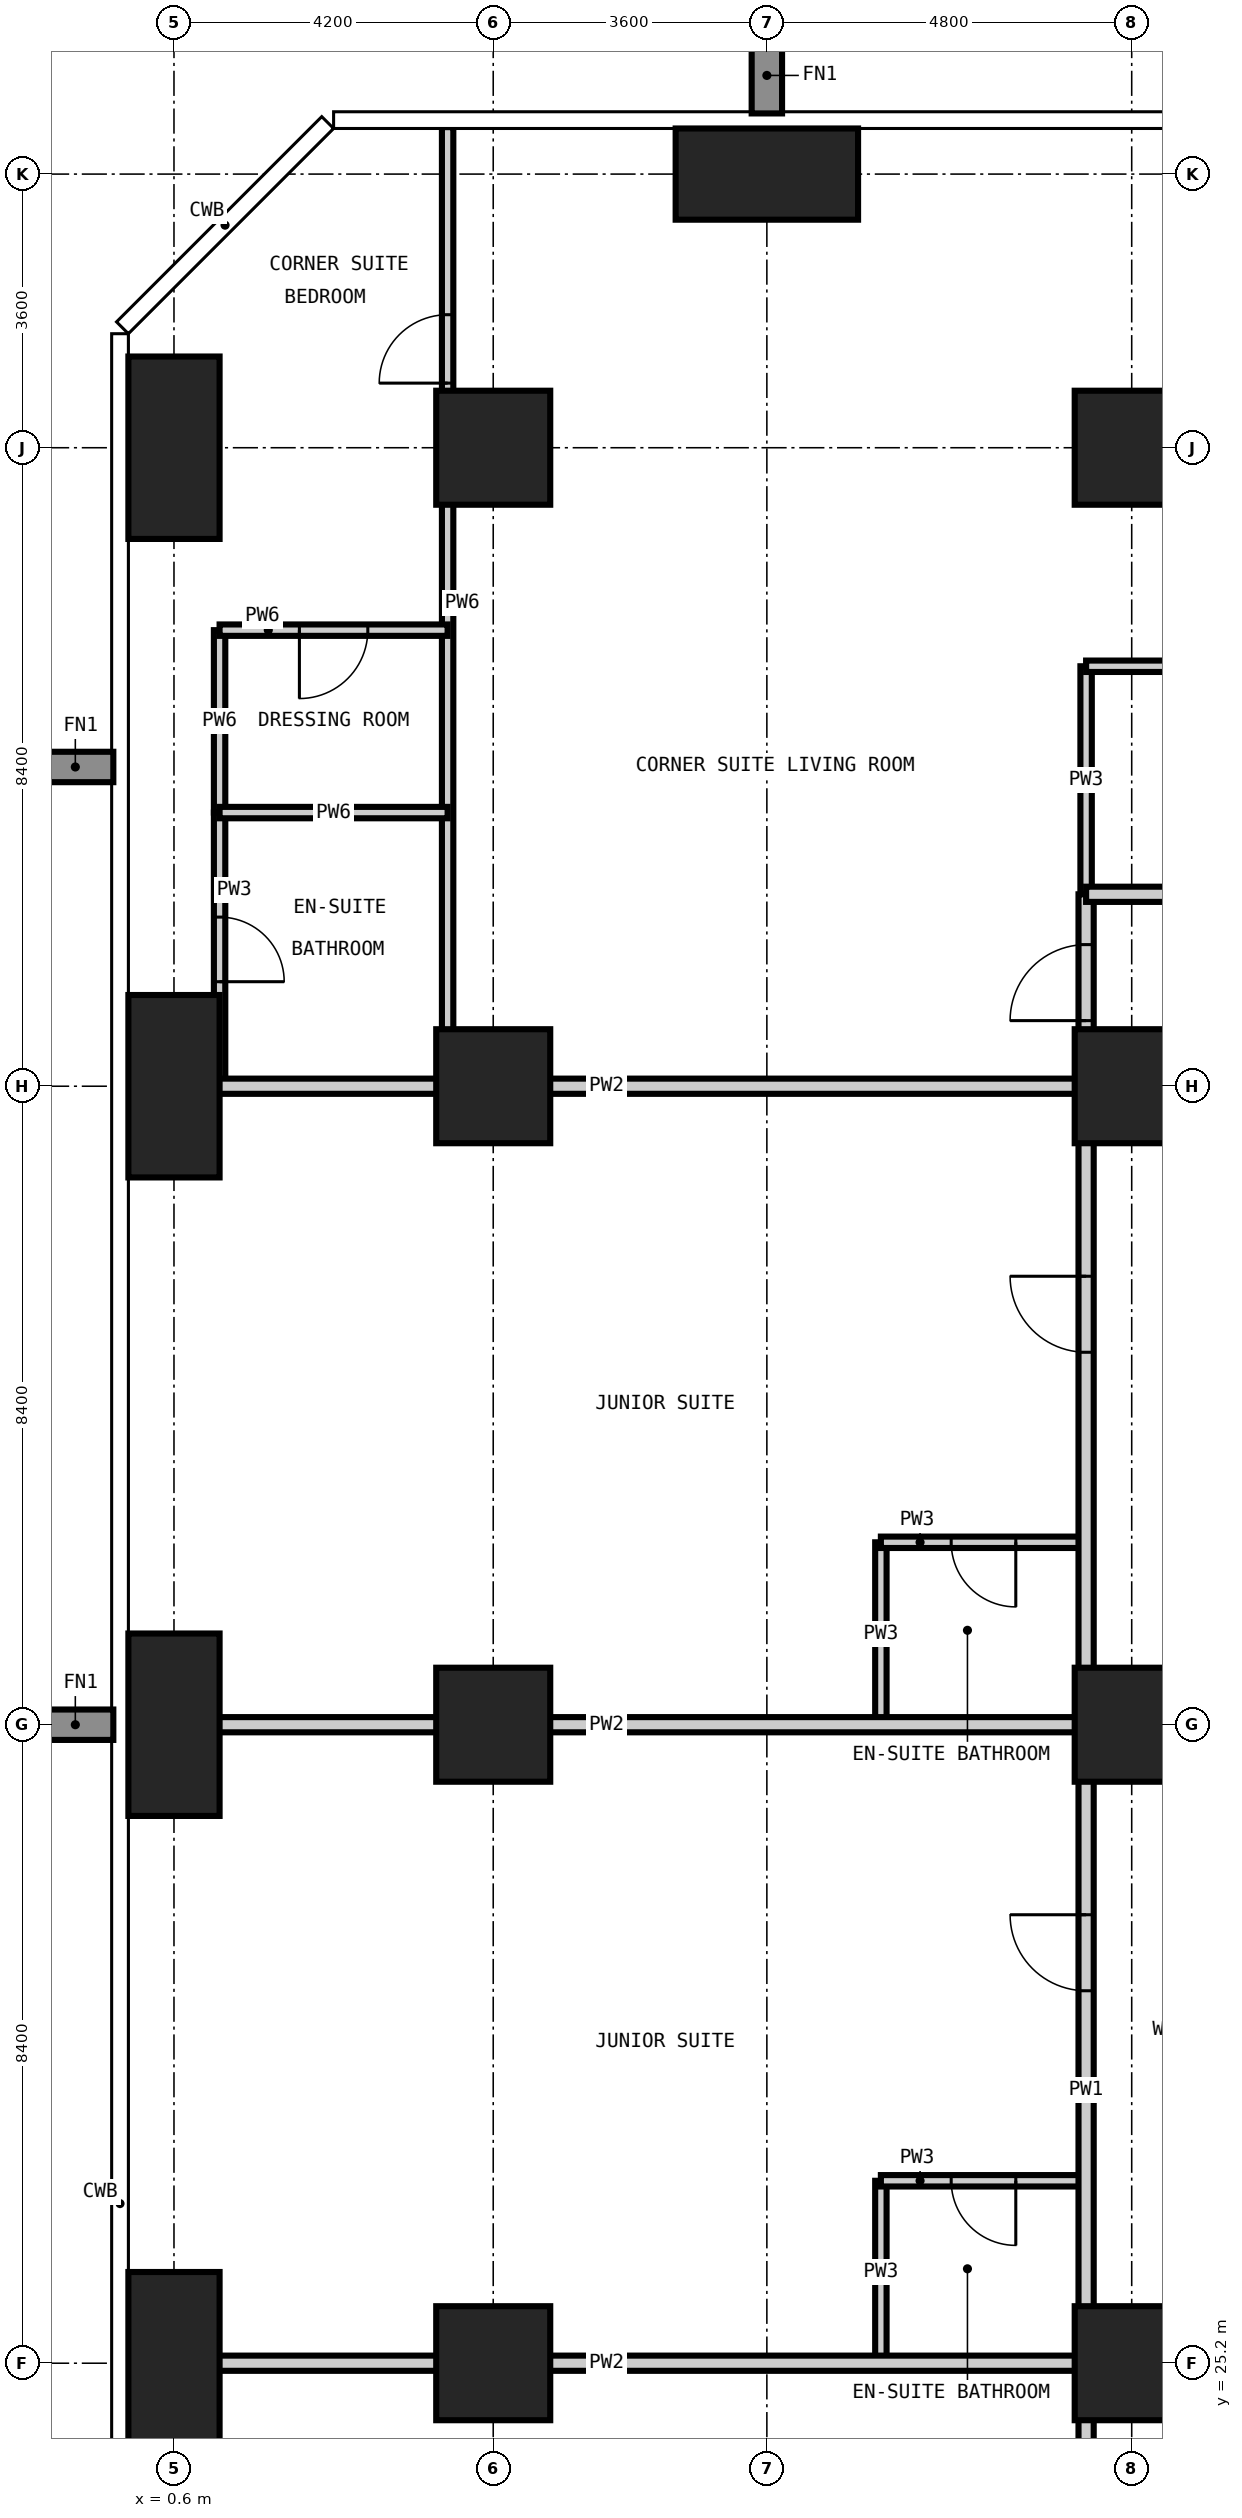
"""IFC4 building model, lengths in metres.
Left out: names, types, materials, properties, quantities, classifications, styles, units other than length and angle.
Written with IfcOpenShell. Run it as: python <this file> out.ifc"""

import sys

from ifc_helpers import new_model, si_unit, direction, frame, frame_2d, origin, origin_2d, place, context, subcontext, project, spatial, rectangle, extrude, element, fill, save


model = new_model("IFC4")
c1 = context("Model", 3, precision=1e-05, world=origin(), true_north=direction((0.0, 1.0)))
c2 = subcontext(c1, "Body", "Model", "MODEL_VIEW")
j1 = project(units=[si_unit("LENGTHUNIT", "METRE"), si_unit("PLANEANGLEUNIT", "RADIAN")], contexts=[c1])
p1 = place(None, origin())
s1 = spatial("IfcSite", under=j1, at=p1, CompositionType="ELEMENT")
p2 = place(p1, origin())
s2 = spatial("IfcBuilding", under=s1, at=p2, CompositionType="ELEMENT")
p3 = place(p2, frame((0.0, 0.0, 118.8)))
s3 = spatial("IfcBuildingStorey", under=s2, at=p3, CompositionType="ELEMENT", Elevation=118.8)
for number, where, z_axis, x_axis in (
    (1, (0.6, 25.2, -0.35), (0.0, 0.0, 1.0), (1.0, 0.0, 0.0)),
    (2, (0.6, 33.6, -0.35), (0.0, 0.0, 1.0), (1.0, 0.0, 0.0)),
    (3, (0.6, 42.0, -0.35), (0.0, 0.0, 1.0), (1.0, 0.0, 0.0)),
    (4, (0.6, 50.4, -0.35), (0.0, 0.0, 1.0), (1.0, 0.0, 0.0)),
):
    element("IfcColumn", number, at=place(p3, frame(where, z_axis=z_axis, x_axis=x_axis)), inside=s3, PredefinedType="COLUMN", context=c2, shape_type="SweptSolid", body=[
        extrude(rectangle(XDim=1.2, YDim=2.4, at=origin_2d()), origin(), (0.0, 0.0, 1.0), 3.6),
    ])
for number, where, z_axis, x_axis in (
    (5, (4.8, 25.2, -0.35), (0.0, 0.0, 1.0), (1.0, 0.0, 0.0)),
    (6, (4.8, 33.6, -0.35), (0.0, 0.0, 1.0), (1.0, 0.0, 0.0)),
    (7, (4.8, 42.0, -0.35), (0.0, 0.0, 1.0), (1.0, 0.0, 0.0)),
    (8, (4.8, 50.4, -0.35), (0.0, 0.0, 1.0), (1.0, 0.0, 0.0)),
):
    element("IfcColumn", number, at=place(p3, frame(where, z_axis=z_axis, x_axis=x_axis)), inside=s3, PredefinedType="COLUMN", context=c2, shape_type="SweptSolid", body=[
        extrude(rectangle(XDim=1.5, YDim=1.5, at=origin_2d()), origin(), (0.0, 0.0, 1.0), 3.6),
    ])
p4 = place(p3, frame((8.4, 54.0, -0.35), z_axis=(0.0, 0.0, 1.0), x_axis=(1.0, 0.0, 0.0)))
e9 = element("IfcColumn", 9, at=p4, inside=s3, PredefinedType="COLUMN", context=c2, shape_type="SweptSolid", body=[
    extrude(rectangle(XDim=2.4, YDim=1.2, at=origin_2d()), origin(), (0.0, 0.0, 1.0), 3.6),
])
for number, where, z_axis, x_axis in (
    (10, (13.2, 25.2, -0.35), (0.0, 0.0, 1.0), (1.0, 0.0, 0.0)),
    (11, (13.2, 33.6, -0.35), (0.0, 0.0, 1.0), (1.0, 0.0, 0.0)),
    (12, (13.2, 42.0, -0.35), (0.0, 0.0, 1.0), (1.0, 0.0, 0.0)),
    (13, (13.2, 50.4, -0.35), (0.0, 0.0, 1.0), (1.0, 0.0, 0.0)),
):
    element("IfcColumn", number, at=place(p3, frame(where, z_axis=z_axis, x_axis=x_axis)), inside=s3, PredefinedType="COLUMN", context=c2, shape_type="SweptSolid", body=[
        extrude(rectangle(XDim=1.5, YDim=1.5, at=origin_2d()), origin(), (0.0, 0.0, 1.0), 3.6),
    ])
p5 = place(p3, frame((1.2, 42.0, 0.0), z_axis=(0.0, 0.0, 1.0), x_axis=(0.0, 1.0, 0.0)))
e14 = element("IfcWall", 14, at=p5, inside=s3, PredefinedType="PARTITIONING", context=c2, shape_type="SweptSolid", body=[
    extrude(rectangle(XDim=3.6, YDim=0.15, at=frame_2d((1.8, 0.0))), origin(), (0.0, 0.0, 1.0), 3.25),
])
p6 = place(p5, frame((1.375, 0.0, 0.0)))
e15 = element("IfcOpeningElement", 15, at=p6, cuts=e14, PredefinedType="OPENING", context=c2, shape_type="SweptSolid", body=[
    extrude(rectangle(XDim=0.85, YDim=2.1, at=frame_2d((0.425, 1.05))), frame((0.0, 0.085, 0.0), z_axis=(0.0, -1.0, 0.0), x_axis=(1.0, 0.0, 0.0)), (0.0, 0.0, 1.0), 0.17),
])
p7 = place(p3, frame((9.9, 25.2, 0.0), z_axis=(0.0, 0.0, 1.0), x_axis=(0.0, 1.0, 0.0)))
e16 = element("IfcWall", 16, at=p7, inside=s3, PredefinedType="PARTITIONING", context=c2, shape_type="SweptSolid", body=[
    extrude(rectangle(XDim=2.4, YDim=0.15, at=frame_2d((1.2, 0.0))), origin(), (0.0, 0.0, 1.0), 3.25),
])
p8 = place(p3, frame((9.9, 33.6, 0.0), z_axis=(0.0, 0.0, 1.0), x_axis=(0.0, 1.0, 0.0)))
e17 = element("IfcWall", 17, at=p8, inside=s3, PredefinedType="PARTITIONING", context=c2, shape_type="SweptSolid", body=[
    extrude(rectangle(XDim=2.4, YDim=0.15, at=frame_2d((1.2, 0.0))), origin(), (0.0, 0.0, 1.0), 3.25),
])
p9 = place(p3, frame((12.6, 44.525, 0.0), z_axis=(0.0, 0.0, 1.0), x_axis=(0.0, 1.0, 0.0)))
e18 = element("IfcWall", 18, at=p9, inside=s3, PredefinedType="PARTITIONING", context=c2, shape_type="SweptSolid", body=[
    extrude(rectangle(XDim=3.0, YDim=0.15, at=frame_2d((1.5, 0.0))), origin(), (0.0, 0.0, 1.0), 3.25),
])
p10 = place(p3, frame((9.9, 27.6, 0.0), z_axis=(0.0, 0.0, 1.0), x_axis=(1.0, 0.0, 0.0)))
e19 = element("IfcWall", 19, at=p10, inside=s3, PredefinedType="PARTITIONING", context=c2, shape_type="SweptSolid", body=[
    extrude(rectangle(XDim=2.7, YDim=0.15, at=frame_2d((1.35, 0.0))), origin(), (0.0, 0.0, 1.0), 3.25),
])
p11 = place(p10, frame((0.925, 0.0, 0.0)))
e20 = element("IfcOpeningElement", 20, at=p11, cuts=e19, PredefinedType="OPENING", context=c2, shape_type="SweptSolid", body=[
    extrude(rectangle(XDim=0.85, YDim=2.1, at=frame_2d((0.425, 1.05))), frame((0.0, 0.085, 0.0), z_axis=(0.0, -1.0, 0.0), x_axis=(1.0, 0.0, 0.0)), (0.0, 0.0, 1.0), 0.17),
])
p12 = place(p3, frame((9.9, 36.0, 0.0), z_axis=(0.0, 0.0, 1.0), x_axis=(1.0, 0.0, 0.0)))
e21 = element("IfcWall", 21, at=p12, inside=s3, PredefinedType="PARTITIONING", context=c2, shape_type="SweptSolid", body=[
    extrude(rectangle(XDim=2.7, YDim=0.15, at=frame_2d((1.35, 0.0))), origin(), (0.0, 0.0, 1.0), 3.25),
])
p13 = place(p12, frame((0.925, 0.0, 0.0)))
e22 = element("IfcOpeningElement", 22, at=p13, cuts=e21, PredefinedType="OPENING", context=c2, shape_type="SweptSolid", body=[
    extrude(rectangle(XDim=0.85, YDim=2.1, at=frame_2d((0.425, 1.05))), frame((0.0, 0.085, 0.0), z_axis=(0.0, -1.0, 0.0), x_axis=(1.0, 0.0, 0.0)), (0.0, 0.0, 1.0), 0.17),
])
p14 = place(p3, frame((12.6, 47.525, 0.0), z_axis=(0.0, 0.0, 1.0), x_axis=(1.0, 0.0, 0.0)))
e23 = element("IfcWall", 23, at=p14, inside=s3, PredefinedType="PARTITIONING", context=c2, shape_type="SweptSolid", body=[
    extrude(rectangle(XDim=4.2, YDim=0.15, at=frame_2d((2.1, 0.0))), origin(), (0.0, 0.0, 1.0), 3.25),
])
p15 = place(p14, frame((1.675, 0.0, 0.0)))
e24 = element("IfcOpeningElement", 24, at=p15, cuts=e23, PredefinedType="OPENING", context=c2, shape_type="SweptSolid", body=[
    extrude(rectangle(XDim=0.85, YDim=2.1, at=frame_2d((0.425, 1.05))), frame((0.0, 0.085, 0.0), z_axis=(0.0, -1.0, 0.0), x_axis=(1.0, 0.0, 0.0)), (0.0, 0.0, 1.0), 0.17),
])
p16 = place(p3, frame((12.6, 13.075, 0.0), z_axis=(0.0, 0.0, 1.0), x_axis=(0.0, 1.0, 0.0)))
e25 = element("IfcWall", 25, at=p16, inside=s3, PredefinedType="PARTITIONING", context=c2, shape_type="SweptSolid", body=[
    extrude(rectangle(XDim=31.45, YDim=0.2, at=frame_2d((15.725, 0.0))), origin(), (0.0, 0.0, 1.0), 3.25),
])
p17 = place(p16, frame((8.625, 0.0, 0.0)))
e26 = element("IfcOpeningElement", 26, at=p17, cuts=e25, PredefinedType="OPENING", context=c2, shape_type="SweptSolid", body=[
    extrude(rectangle(XDim=1.0, YDim=2.2, at=frame_2d((0.5, 1.1))), frame((0.0, 0.11, 0.0), z_axis=(0.0, -1.0, 0.0), x_axis=(1.0, 0.0, 0.0)), (0.0, 0.0, 1.0), 0.22),
])
p18 = place(p16, frame((17.025, 0.0, 0.0)))
e27 = element("IfcOpeningElement", 27, at=p18, cuts=e25, PredefinedType="OPENING", context=c2, shape_type="SweptSolid", body=[
    extrude(rectangle(XDim=1.0, YDim=2.2, at=frame_2d((0.5, 1.1))), frame((0.0, 0.11, 0.0), z_axis=(0.0, -1.0, 0.0), x_axis=(1.0, 0.0, 0.0)), (0.0, 0.0, 1.0), 0.22),
])
p19 = place(p16, frame((25.425, 0.0, 0.0)))
e28 = element("IfcOpeningElement", 28, at=p19, cuts=e25, PredefinedType="OPENING", context=c2, shape_type="SweptSolid", body=[
    extrude(rectangle(XDim=1.0, YDim=2.2, at=frame_2d((0.5, 1.1))), frame((0.0, 0.11, 0.0), z_axis=(0.0, -1.0, 0.0), x_axis=(1.0, 0.0, 0.0)), (0.0, 0.0, 1.0), 0.22),
])
p20 = place(p16, frame((1.363, 0.0, 0.0)))
e29 = element("IfcOpeningElement", 29, at=p20, cuts=e25, PredefinedType="OPENING", context=c2, shape_type="SweptSolid", body=[
    extrude(rectangle(XDim=1.0, YDim=2.2, at=frame_2d((0.5, 1.1))), frame((0.0, 0.11, 0.0), z_axis=(0.0, -1.0, 0.0), x_axis=(1.0, 0.0, 0.0)), (0.0, 0.0, 1.0), 0.22),
])
p21 = place(p16, frame((29.788, 0.0, 0.0)))
e30 = element("IfcOpeningElement", 30, at=p21, cuts=e25, PredefinedType="OPENING", context=c2, shape_type="SweptSolid", body=[
    extrude(rectangle(XDim=1.0, YDim=2.2, at=frame_2d((0.5, 1.1))), frame((0.0, 0.11, 0.0), z_axis=(0.0, -1.0, 0.0), x_axis=(1.0, 0.0, 0.0)), (0.0, 0.0, 1.0), 0.22),
])
p22 = place(p3, frame((12.6, 44.525, 0.0), z_axis=(0.0, 0.0, 1.0), x_axis=(1.0, 0.0, 0.0)))
e31 = element("IfcWall", 31, at=p22, inside=s3, PredefinedType="PARTITIONING", context=c2, shape_type="SweptSolid", body=[
    extrude(rectangle(XDim=32.525, YDim=0.2, at=frame_2d((16.262, 0.0))), origin(), (0.0, 0.0, 1.0), 3.25),
])
p23 = place(p22, frame((9.1, 0.0, 0.0)))
e32 = element("IfcOpeningElement", 32, at=p23, cuts=e31, PredefinedType="OPENING", context=c2, shape_type="SweptSolid", body=[
    extrude(rectangle(XDim=1.0, YDim=2.2, at=frame_2d((0.5, 1.1))), frame((0.0, 0.11, 0.0), z_axis=(0.0, -1.0, 0.0), x_axis=(1.0, 0.0, 0.0)), (0.0, 0.0, 1.0), 0.22),
])
p24 = place(p22, frame((17.5, 0.0, 0.0)))
e33 = element("IfcOpeningElement", 33, at=p24, cuts=e31, PredefinedType="OPENING", context=c2, shape_type="SweptSolid", body=[
    extrude(rectangle(XDim=1.0, YDim=2.2, at=frame_2d((0.5, 1.1))), frame((0.0, 0.11, 0.0), z_axis=(0.0, -1.0, 0.0), x_axis=(1.0, 0.0, 0.0)), (0.0, 0.0, 1.0), 0.22),
])
p25 = place(p22, frame((25.9, 0.0, 0.0)))
e34 = element("IfcOpeningElement", 34, at=p25, cuts=e31, PredefinedType="OPENING", context=c2, shape_type="SweptSolid", body=[
    extrude(rectangle(XDim=1.0, YDim=2.2, at=frame_2d((0.5, 1.1))), frame((0.0, 0.11, 0.0), z_axis=(0.0, -1.0, 0.0), x_axis=(1.0, 0.0, 0.0)), (0.0, 0.0, 1.0), 0.22),
])
for number, where, z_axis, x_axis in (
    (35, (-0.018, 25.2, 0.0), (0.0, 0.0, 1.0), (1.0, 0.0, 0.0)),
    (36, (-0.018, 33.6, 0.0), (0.0, 0.0, 1.0), (1.0, 0.0, 0.0)),
    (37, (-0.018, 42.0, 0.0), (0.0, 0.0, 1.0), (1.0, 0.0, 0.0)),
):
    element("IfcWall", number, at=place(p3, frame(where, z_axis=z_axis, x_axis=x_axis)), inside=s3, PredefinedType="PARTITIONING", context=c2, shape_type="SweptSolid", body=[
        extrude(rectangle(XDim=12.618, YDim=0.2, at=frame_2d((6.309, 0.0))), origin(), (0.0, 0.0, 1.0), 3.25),
    ])
p26 = place(p3, frame((1.2, 45.6, 0.0), z_axis=(0.0, 0.0, 1.0), x_axis=(0.0, 1.0, 0.0)))
e38 = element("IfcWall", 38, at=p26, inside=s3, PredefinedType="PARTITIONING", context=c2, shape_type="SweptSolid", body=[
    extrude(rectangle(XDim=2.4, YDim=0.15, at=frame_2d((1.2, 0.0))), origin(), (0.0, 0.0, 1.0), 3.25),
])
p27 = place(p3, frame((4.2, 42.0, 0.0), z_axis=(0.0, 0.0, 1.0), x_axis=(0.0, 1.0, 0.0)))
e39 = element("IfcWall", 39, at=p27, inside=s3, PredefinedType="PARTITIONING", context=c2, shape_type="SweptSolid", body=[
    extrude(rectangle(XDim=12.618, YDim=0.15, at=frame_2d((6.309, 0.0))), origin(), (0.0, 0.0, 1.0), 3.25),
])
p28 = place(p27, frame((9.25, 0.0, 0.0)))
e40 = element("IfcOpeningElement", 40, at=p28, cuts=e39, PredefinedType="OPENING", context=c2, shape_type="SweptSolid", body=[
    extrude(rectangle(XDim=0.9, YDim=2.1, at=frame_2d((0.45, 1.05))), frame((0.0, 0.085, 0.0), z_axis=(0.0, -1.0, 0.0), x_axis=(1.0, 0.0, 0.0)), (0.0, 0.0, 1.0), 0.17),
])
p29 = place(p3, frame((1.2, 45.6, 0.0), z_axis=(0.0, 0.0, 1.0), x_axis=(1.0, 0.0, 0.0)))
e41 = element("IfcWall", 41, at=p29, inside=s3, PredefinedType="PARTITIONING", context=c2, shape_type="SweptSolid", body=[
    extrude(rectangle(XDim=3.0, YDim=0.15, at=frame_2d((1.5, 0.0))), origin(), (0.0, 0.0, 1.0), 3.25),
])
p30 = place(p3, frame((1.2, 48.0, 0.0), z_axis=(0.0, 0.0, 1.0), x_axis=(1.0, 0.0, 0.0)))
e42 = element("IfcWall", 42, at=p30, inside=s3, PredefinedType="PARTITIONING", context=c2, shape_type="SweptSolid", body=[
    extrude(rectangle(XDim=3.0, YDim=0.15, at=frame_2d((1.5, 0.0))), origin(), (0.0, 0.0, 1.0), 3.25),
])
p31 = place(p30, frame((1.05, 0.0, 0.0)))
e43 = element("IfcOpeningElement", 43, at=p31, cuts=e42, PredefinedType="OPENING", context=c2, shape_type="SweptSolid", body=[
    extrude(rectangle(XDim=0.9, YDim=2.1, at=frame_2d((0.45, 1.05))), frame((0.0, 0.085, 0.0), z_axis=(0.0, -1.0, 0.0), x_axis=(1.0, 0.0, 0.0)), (0.0, 0.0, 1.0), 0.17),
])
p32 = place(p18, origin())
e44 = element("IfcDoor", 44, at=p32, inside=s3, OperationType="SINGLE_SWING_RIGHT", PredefinedType="DOOR", context=c2, shape_type="SweptSolid", body=[
    extrude(rectangle(XDim=1.0, YDim=2.2, at=frame_2d((0.5, 1.1))), frame((0.0, 0.025, 0.0), z_axis=(0.0, -1.0, 0.0), x_axis=(1.0, 0.0, 0.0)), (0.0, 0.0, 1.0), 0.05),
])
fill(e27, e44)
p33 = place(p11, frame((0.85, 0.0, 0.0), z_axis=(0.0, 0.0, 1.0), x_axis=(-1.0, 0.0, 0.0)))
e45 = element("IfcDoor", 45, at=p33, inside=s3, OperationType="SINGLE_SWING_LEFT", PredefinedType="DOOR", context=c2, shape_type="SweptSolid", body=[
    extrude(rectangle(XDim=0.85, YDim=2.1, at=frame_2d((0.425, 1.05))), frame((0.0, 0.025, 0.0), z_axis=(0.0, -1.0, 0.0), x_axis=(1.0, 0.0, 0.0)), (0.0, 0.0, 1.0), 0.05),
])
fill(e20, e45)
p34 = place(p19, origin())
e46 = element("IfcDoor", 46, at=p34, inside=s3, OperationType="SINGLE_SWING_RIGHT", PredefinedType="DOOR", context=c2, shape_type="SweptSolid", body=[
    extrude(rectangle(XDim=1.0, YDim=2.2, at=frame_2d((0.5, 1.1))), frame((0.0, 0.025, 0.0), z_axis=(0.0, -1.0, 0.0), x_axis=(1.0, 0.0, 0.0)), (0.0, 0.0, 1.0), 0.05),
])
fill(e28, e46)
p35 = place(p13, frame((0.85, 0.0, 0.0), z_axis=(0.0, 0.0, 1.0), x_axis=(-1.0, 0.0, 0.0)))
e47 = element("IfcDoor", 47, at=p35, inside=s3, OperationType="SINGLE_SWING_LEFT", PredefinedType="DOOR", context=c2, shape_type="SweptSolid", body=[
    extrude(rectangle(XDim=0.85, YDim=2.1, at=frame_2d((0.425, 1.05))), frame((0.0, 0.025, 0.0), z_axis=(0.0, -1.0, 0.0), x_axis=(1.0, 0.0, 0.0)), (0.0, 0.0, 1.0), 0.05),
])
fill(e22, e47)
p36 = place(p21, origin())
e48 = element("IfcDoor", 48, at=p36, inside=s3, OperationType="SINGLE_SWING_LEFT", PredefinedType="DOOR", context=c2, shape_type="SweptSolid", body=[
    extrude(rectangle(XDim=1.0, YDim=2.2, at=frame_2d((0.5, 1.1))), frame((0.0, 0.025, 0.0), z_axis=(0.0, -1.0, 0.0), x_axis=(1.0, 0.0, 0.0)), (0.0, 0.0, 1.0), 0.05),
])
fill(e30, e48)
p37 = place(p28, origin())
e49 = element("IfcDoor", 49, at=p37, inside=s3, OperationType="SINGLE_SWING_LEFT", PredefinedType="DOOR", context=c2, shape_type="SweptSolid", body=[
    extrude(rectangle(XDim=0.9, YDim=2.1, at=frame_2d((0.45, 1.05))), frame((0.0, 0.025, 0.0), z_axis=(0.0, -1.0, 0.0), x_axis=(1.0, 0.0, 0.0)), (0.0, 0.0, 1.0), 0.05),
])
fill(e40, e49)
p38 = place(p6, frame((0.85, 0.0, 0.0), z_axis=(0.0, 0.0, 1.0), x_axis=(-1.0, 0.0, 0.0)))
e50 = element("IfcDoor", 50, at=p38, inside=s3, OperationType="SINGLE_SWING_RIGHT", PredefinedType="DOOR", context=c2, shape_type="SweptSolid", body=[
    extrude(rectangle(XDim=0.85, YDim=2.1, at=frame_2d((0.425, 1.05))), frame((0.0, 0.025, 0.0), z_axis=(0.0, -1.0, 0.0), x_axis=(1.0, 0.0, 0.0)), (0.0, 0.0, 1.0), 0.05),
])
fill(e15, e50)
p39 = place(p31, frame((0.9, 0.0, 0.0), z_axis=(0.0, 0.0, 1.0), x_axis=(-1.0, 0.0, 0.0)))
e51 = element("IfcDoor", 51, at=p39, inside=s3, OperationType="SINGLE_SWING_RIGHT", PredefinedType="DOOR", context=c2, shape_type="SweptSolid", body=[
    extrude(rectangle(XDim=0.9, YDim=2.1, at=frame_2d((0.45, 1.05))), frame((0.0, 0.025, 0.0), z_axis=(0.0, -1.0, 0.0), x_axis=(1.0, 0.0, 0.0)), (0.0, 0.0, 1.0), 0.05),
])
fill(e43, e51)
save(model, sys.argv[1])
